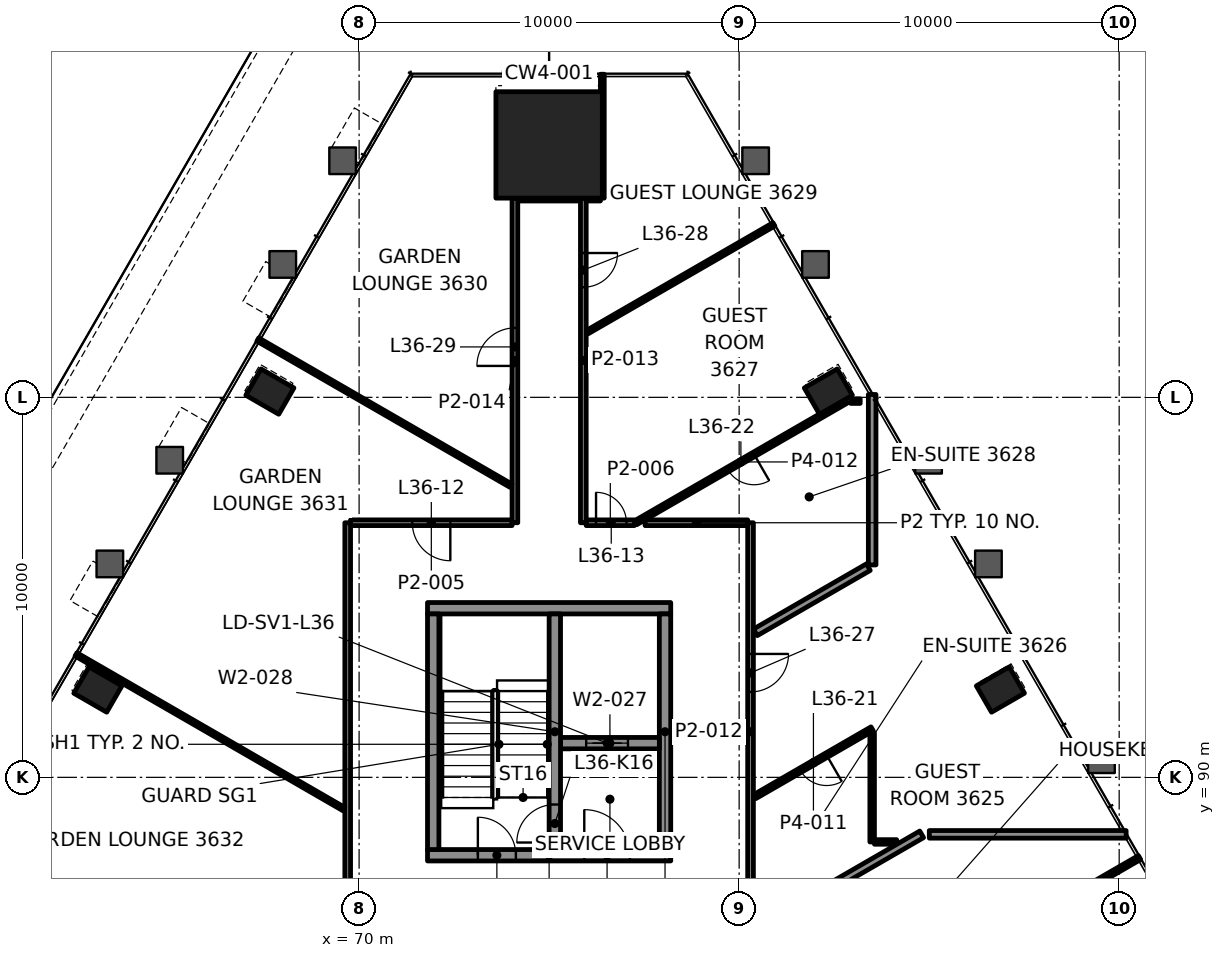
"""IFC4 building model, lengths in metres.
Left out: names, types, materials, properties, quantities, classifications, styles, units other than length and angle.
Written with IfcOpenShell. Run it as: python <this file> out.ifc"""

import sys

from ifc_helpers import new_model, si_unit, direction, frame, frame_2d, origin, origin_2d, place, context, subcontext, project, spatial, rectangle, hollow_rectangle, extrude, element, fill, save


model = new_model("IFC4")
c1 = context("Model", 3, precision=1e-05, world=origin(), true_north=direction((0.0, 1.0)))
c2 = subcontext(c1, "Body", "Model", "MODEL_VIEW")
j1 = project(units=[si_unit("LENGTHUNIT", "METRE"), si_unit("PLANEANGLEUNIT", "RADIAN")], contexts=[c1])
p1 = place(None, origin())
s1 = spatial("IfcSite", under=j1, at=p1, CompositionType="ELEMENT")
p2 = place(p1, origin())
s2 = spatial("IfcBuilding", under=s1, at=p2, CompositionType="ELEMENT")
p3 = place(p2, frame((0.0, 0.0, 159.7)))
s3 = spatial("IfcBuildingStorey", under=s2, at=p3, CompositionType="ELEMENT", Elevation=159.7)
p4 = place(p3, frame((75.0, 106.642, 0.0), z_axis=(0.0, 0.0, 1.0), x_axis=(-1.0, 0.0, 0.0)))
e1 = element("IfcColumn", 1, at=p4, inside=s3, PredefinedType="COLUMN", context=c2, shape_type="SweptSolid", body=[
    extrude(rectangle(XDim=2.8, YDim=2.8, at=origin_2d()), origin(), (0.0, 0.0, 1.0), 3.9),
])
for number, where, z_axis, x_axis in (
    (2, (86.875, 92.31, -0.0), (0.0, 0.0, 1.0), (-0.5, 0.866, 0.0)),
    (3, (82.348, 100.151, -0.0), (0.0, 0.0, 1.0), (-0.5, 0.866, 0.0)),
    (4, (67.652, 100.151, -0.0), (0.0, 0.0, 1.0), (-0.5, -0.866, 0.0)),
    (5, (63.125, 92.31, -0.0), (0.0, 0.0, 1.0), (-0.5, -0.866, 0.0)),
):
    element("IfcColumn", number, at=place(p3, frame(where, z_axis=z_axis, x_axis=x_axis)), inside=s3, PredefinedType="COLUMN", context=c2, shape_type="SweptSolid", body=[
        extrude(hollow_rectangle(XDim=0.8, YDim=1.0, WallThickness=0.05, at=origin_2d()), origin(), (0.0, 0.0, 1.0), 3.9),
    ])
p5 = place(p3, frame((71.8, 87.95, 0.0), z_axis=(0.0, 0.0, 1.0), x_axis=(1.0, 0.0, 0.0)))
e6 = element("IfcWall", 6, at=p5, inside=s3, PredefinedType="SHEAR", context=c2, shape_type="SweptSolid", body=[
    extrude(rectangle(XDim=6.4, YDim=0.3, at=frame_2d((3.2, 0.0))), origin(), (0.0, 0.0, 1.0), 3.7),
])
p6 = place(p5, frame((1.325, 0.0, 0.0)))
e7 = element("IfcOpeningElement", 7, at=p6, cuts=e6, PredefinedType="OPENING", context=c2, shape_type="SweptSolid", body=[
    extrude(rectangle(XDim=1.0, YDim=2.1, at=frame_2d((0.5, 1.05))), frame((0.0, 0.16, 0.0), z_axis=(0.0, -1.0, 0.0), x_axis=(1.0, 0.0, 0.0)), (0.0, 0.0, 1.0), 0.32),
])
p7 = place(p5, frame((4.125, 0.0, 0.0)))
e8 = element("IfcOpeningElement", 8, at=p7, cuts=e6, PredefinedType="OPENING", context=c2, shape_type="SweptSolid", body=[
    extrude(rectangle(XDim=1.2, YDim=2.1, at=frame_2d((0.6, 1.05))), frame((0.0, 0.16, 0.0), z_axis=(0.0, -1.0, 0.0), x_axis=(1.0, 0.0, 0.0)), (0.0, 0.0, 1.0), 0.32),
])
p8 = place(p3, frame((71.8, 94.45, 0.0), z_axis=(0.0, 0.0, 1.0), x_axis=(1.0, 0.0, 0.0)))
e9 = element("IfcWall", 9, at=p8, inside=s3, PredefinedType="SHEAR", context=c2, shape_type="SweptSolid", body=[
    extrude(rectangle(XDim=6.4, YDim=0.3, at=frame_2d((3.2, 0.0))), origin(), (0.0, 0.0, 1.0), 3.7),
])
for number, where, z_axis, x_axis in (
    (10, (71.95, 88.1, 0.0), (0.0, 0.0, 1.0), (0.0, 1.0, 0.0)),
    (11, (78.05, 88.1, 0.0), (0.0, 0.0, 1.0), (0.0, 1.0, 0.0)),
):
    element("IfcWall", number, at=place(p3, frame(where, z_axis=z_axis, x_axis=x_axis)), inside=s3, PredefinedType="SHEAR", context=c2, shape_type="SweptSolid", body=[
        extrude(rectangle(XDim=6.2, YDim=0.3, at=frame_2d((3.1, 0.0))), origin(), (0.0, 0.0, 1.0), 3.7),
    ])
p9 = place(p3, frame((75.3, 90.9, 0.0), z_axis=(0.0, 0.0, 1.0), x_axis=(1.0, 0.0, 0.0)))
e12 = element("IfcWall", 12, at=p9, inside=s3, PredefinedType="SHEAR", context=c2, shape_type="SweptSolid", body=[
    extrude(rectangle(XDim=2.6, YDim=0.3, at=frame_2d((1.3, 0.0))), origin(), (0.0, 0.0, 1.0), 3.7),
])
p10 = place(p9, frame((0.675, 0.0, 0.0)))
e13 = element("IfcOpeningElement", 13, at=p10, cuts=e12, PredefinedType="OPENING", context=c2, shape_type="SweptSolid", body=[
    extrude(rectangle(XDim=1.1, YDim=2.1, at=frame_2d((0.55, 1.05))), frame((0.0, 0.16, 0.0), z_axis=(0.0, -1.0, 0.0), x_axis=(1.0, 0.0, 0.0)), (0.0, 0.0, 1.0), 0.32),
])
p11 = place(p3, frame((75.15, 88.1, 0.0), z_axis=(0.0, 0.0, 1.0), x_axis=(0.0, 1.0, 0.0)))
e14 = element("IfcWall", 14, at=p11, inside=s3, PredefinedType="SHEAR", context=c2, shape_type="SweptSolid", body=[
    extrude(rectangle(XDim=6.2, YDim=0.3, at=frame_2d((3.1, 0.0))), origin(), (0.0, 0.0, 1.0), 3.7),
])
p12 = place(p11, frame((0.185, 0.0, 0.0)))
e15 = element("IfcOpeningElement", 15, at=p12, cuts=e14, PredefinedType="OPENING", context=c2, shape_type="SweptSolid", body=[
    extrude(rectangle(XDim=1.0, YDim=2.1, at=frame_2d((0.5, 1.05))), frame((0.0, 0.16, 0.0), z_axis=(0.0, -1.0, 0.0), x_axis=(1.0, 0.0, 0.0)), (0.0, 0.0, 1.0), 0.32),
])
p13 = place(p3, frame((83.56, 88.3, 0.0), z_axis=(0.0, 0.0, 1.0), x_axis=(1.0, 0.0, 0.0)))
e16 = element("IfcWall", 16, at=p13, inside=s3, PredefinedType="PARTITIONING", context=c2, shape_type="SweptSolid", body=[
    extrude(rectangle(XDim=0.585, YDim=0.12, at=frame_2d((0.292, 0.0))), origin(), (0.0, 0.0, 1.0), 3.1),
])
p14 = place(p3, frame((85.004, 88.5, 0.0), z_axis=(0.0, 0.0, 1.0), x_axis=(1.0, 0.0, 0.0)))
e17 = element("IfcWall", 17, at=p14, inside=s3, PredefinedType="PARTITIONING", context=c2, shape_type="SweptSolid", body=[
    extrude(rectangle(XDim=5.179, YDim=0.2, at=frame_2d((2.59, 0.0))), origin(), (0.0, 0.0, 1.0), 2.865),
])
p15 = place(p3, frame((74.025, 96.7, 0.0), z_axis=(0.0, 0.0, 1.0), x_axis=(-1.0, 0.0, 0.0)))
e18 = element("IfcWall", 18, at=p15, inside=s3, PredefinedType="PARTITIONING", context=c2, shape_type="SweptSolid", body=[
    extrude(rectangle(XDim=4.25, YDim=0.15, at=frame_2d((2.125, 0.0))), origin(), (0.0, 0.0, 1.0), 3.1),
])
p16 = place(p15, frame((1.625, 0.0, 0.0)))
e19 = element("IfcOpeningElement", 19, at=p16, cuts=e18, PredefinedType="OPENING", context=c2, shape_type="SweptSolid", body=[
    extrude(rectangle(XDim=1.0, YDim=2.1, at=frame_2d((0.5, 1.05))), frame((0.0, 0.085, 0.0), z_axis=(0.0, -1.0, 0.0), x_axis=(1.0, 0.0, 0.0)), (0.0, 0.0, 1.0), 0.17),
])
p17 = place(p3, frame((75.975, 96.7, 0.0), z_axis=(0.0, 0.0, 1.0), x_axis=(1.0, 0.0, 0.0)))
e20 = element("IfcWall", 20, at=p17, inside=s3, PredefinedType="PARTITIONING", context=c2, shape_type="SweptSolid", body=[
    extrude(rectangle(XDim=1.27, YDim=0.15, at=frame_2d((0.635, 0.0))), origin(), (0.0, 0.0, 1.0), 3.1),
])
p18 = place(p17, frame((0.26, 0.0, 0.0)))
e21 = element("IfcOpeningElement", 21, at=p18, cuts=e20, PredefinedType="OPENING", context=c2, shape_type="SweptSolid", body=[
    extrude(rectangle(XDim=0.8, YDim=2.1, at=frame_2d((0.4, 1.05))), frame((0.0, 0.085, 0.0), z_axis=(0.0, -1.0, 0.0), x_axis=(1.0, 0.0, 0.0)), (0.0, 0.0, 1.0), 0.17),
])
p19 = place(p3, frame((82.938, 99.9, 0.0), z_axis=(0.0, 0.0, 1.0), x_axis=(1.0, 0.0, 0.0)))
e22 = element("IfcWall", 22, at=p19, inside=s3, PredefinedType="PARTITIONING", context=c2, shape_type="SweptSolid", body=[
    extrude(rectangle(XDim=0.248, YDim=0.12, at=frame_2d((0.124, 0.0))), origin(), (0.0, 0.0, 1.0), 3.1),
])
p20 = place(p3, frame((74.176, 105.242, 0.0), z_axis=(0.0, 0.0, 1.0), x_axis=(1.0, 0.0, 0.0)))
e23 = element("IfcWall", 23, at=p20, inside=s3, PredefinedType="PARTITIONING", context=c2, shape_type="SweptSolid", body=[
    extrude(rectangle(XDim=1.649, YDim=0.15, at=frame_2d((0.825, 0.0))), origin(), (0.0, 0.0, 1.0), 3.097),
])
p21 = place(p3, frame((85.928, 85.23, 0.0), z_axis=(0.0, 0.0, 1.0), x_axis=(0.866037319036, 0.49997936161, 0.0)))
e24 = element("IfcWall", 24, at=p21, inside=s3, PredefinedType="PARTITIONING", context=c2, shape_type="SweptSolid", body=[
    extrude(rectangle(XDim=5.32, YDim=0.12, at=frame_2d((2.66, 0.0))), origin(), (0.0, 0.0, 1.0), 2.865),
])
p22 = place(p3, frame((80.427, 85.974, 0.0), z_axis=(0.0, 0.0, 1.0), x_axis=(0.866031085144, 0.499990159468, 0.0)))
e25 = element("IfcWall", 25, at=p22, inside=s3, PredefinedType="PARTITIONING", context=c2, shape_type="SweptSolid", body=[
    extrude(rectangle(XDim=5.052, YDim=0.2, at=frame_2d((2.526, 0.0))), origin(), (0.0, 0.0, 1.0), 3.1),
])
p23 = place(p3, frame((83.5, 91.277, 0.0), z_axis=(0.0, 0.0, 1.0), x_axis=(-0.866028357664, -0.499994883695, 0.0)))
e26 = element("IfcWall", 26, at=p23, inside=s3, PredefinedType="PARTITIONING", context=c2, shape_type="SweptSolid", body=[
    extrude(rectangle(XDim=3.568, YDim=0.12, at=frame_2d((1.784, 0.0))), origin(), (0.0, 0.0, 1.0), 3.1),
])
p24 = place(p23, frame((1.384, 0.0, 0.0)))
e27 = element("IfcOpeningElement", 27, at=p24, cuts=e26, PredefinedType="OPENING", context=c2, shape_type="SweptSolid", body=[
    extrude(rectangle(XDim=0.8, YDim=2.1, at=frame_2d((0.4, 1.05))), frame((0.0, 0.07, 0.0), z_axis=(0.0, -1.0, 0.0), x_axis=(1.0, 0.0, 0.0)), (0.0, 0.0, 1.0), 0.14),
])
p25 = place(p3, frame((80.427, 93.815, 0.0), z_axis=(0.0, 0.0, 1.0), x_axis=(0.866037544249, 0.499978971509, 0.0)))
e28 = element("IfcWall", 28, at=p25, inside=s3, PredefinedType="PARTITIONING", context=c2, shape_type="SweptSolid", body=[
    extrude(rectangle(XDim=3.433, YDim=0.2, at=frame_2d((1.716, 0.0))), origin(), (0.0, 0.0, 1.0), 3.1),
])
p26 = place(p3, frame((82.818, 99.9, 0.0), z_axis=(0.0, 0.0, 1.0), x_axis=(-0.866025499775, -0.499999833739, 0.0)))
e29 = element("IfcWall", 29, at=p26, inside=s3, PredefinedType="PARTITIONING", context=c2, shape_type="SweptSolid", body=[
    extrude(rectangle(XDim=6.4, YDim=0.12, at=frame_2d((3.2, 0.0))), origin(), (0.0, 0.0, 1.0), 2.865),
])
p27 = place(p26, frame((2.8, 0.0, 0.0)))
e30 = element("IfcOpeningElement", 30, at=p27, cuts=e29, PredefinedType="OPENING", context=c2, shape_type="SweptSolid", body=[
    extrude(rectangle(XDim=0.8, YDim=2.1, at=frame_2d((0.4, 1.05))), frame((0.0, 0.07, 0.0), z_axis=(0.0, -1.0, 0.0), x_axis=(1.0, 0.0, 0.0)), (0.0, 0.0, 1.0), 0.14),
])
p28 = place(p3, frame((76.001, 101.715, 0.0), z_axis=(0.0, 0.0, 1.0), x_axis=(0.866015782696, 0.500016663843, 0.0)))
e31 = element("IfcWall", 31, at=p28, inside=s3, PredefinedType="PARTITIONING", context=c2, shape_type="SweptSolid", body=[
    extrude(rectangle(XDim=5.675, YDim=0.1, at=frame_2d((2.837, 0.0))), origin(), (0.0, 0.0, 1.0), 3.1),
])
p29 = place(p3, frame((83.5, 88.3, 0.0), z_axis=(0.0, 0.0, 1.0), x_axis=(0.0, 1.0, 0.0)))
e32 = element("IfcWall", 32, at=p29, inside=s3, PredefinedType="PARTITIONING", context=c2, shape_type="SweptSolid", body=[
    extrude(rectangle(XDim=2.868, YDim=0.12, at=frame_2d((1.434, 0.0))), origin(), (0.0, 0.0, 1.0), 3.022),
])
p30 = place(p3, frame((83.5, 95.589, 0.0), z_axis=(0.0, 0.0, 1.0), x_axis=(0.0, 1.0, 0.0)))
e33 = element("IfcWall", 33, at=p30, inside=s3, PredefinedType="PARTITIONING", context=c2, shape_type="SweptSolid", body=[
    extrude(rectangle(XDim=4.486, YDim=0.2, at=frame_2d((2.243, 0.0))), origin(), (0.0, 0.0, 1.0), 2.865),
])
p31 = place(p3, frame((80.3, 96.7, 0.0), z_axis=(0.0, 0.0, 1.0), x_axis=(0.0, -1.0, 0.0)))
e34 = element("IfcWall", 34, at=p31, inside=s3, PredefinedType="PARTITIONING", context=c2, shape_type="SweptSolid", body=[
    extrude(rectangle(XDim=11.0, YDim=0.15, at=frame_2d((5.5, 0.0))), origin(), (0.0, 0.0, 1.0), 3.022),
])
p32 = place(p31, frame((3.452, 0.0, 0.0)))
e35 = element("IfcOpeningElement", 35, at=p32, cuts=e34, PredefinedType="OPENING", context=c2, shape_type="SweptSolid", body=[
    extrude(rectangle(XDim=1.0, YDim=2.1, at=frame_2d((0.5, 1.05))), frame((0.0, 0.085, 0.0), z_axis=(0.0, -1.0, 0.0), x_axis=(1.0, 0.0, 0.0)), (0.0, 0.0, 1.0), 0.17),
])
p33 = place(p3, frame((76.4, 105.243, 0.0), z_axis=(0.0, 0.0, 1.0), x_axis=(0.0, 1.0, 0.0)))
e36 = element("IfcWall", 36, at=p33, inside=s3, PredefinedType="PARTITIONING", context=c2, shape_type="SweptSolid", body=[
    extrude(rectangle(XDim=3.26, YDim=0.1, at=frame_2d((1.63, 0.0))), origin(), (0.0, 0.0, 1.0), 3.1),
])
p34 = place(p3, frame((75.9, 105.242, 0.0), z_axis=(0.0, 0.0, 1.0), x_axis=(0.0, -1.0, 0.0)))
e37 = element("IfcWall", 37, at=p34, inside=s3, PredefinedType="PARTITIONING", context=c2, shape_type="SweptSolid", body=[
    extrude(rectangle(XDim=8.542, YDim=0.15, at=frame_2d((4.271, 0.0))), origin(), (0.0, 0.0, 1.0), 3.1),
])
p35 = place(p34, frame((1.445, 0.0, 0.0)))
e38 = element("IfcOpeningElement", 38, at=p35, cuts=e37, PredefinedType="OPENING", context=c2, shape_type="SweptSolid", body=[
    extrude(rectangle(XDim=0.9, YDim=2.1, at=frame_2d((0.45, 1.05))), frame((0.0, 0.085, 0.0), z_axis=(0.0, -1.0, 0.0), x_axis=(1.0, 0.0, 0.0)), (0.0, 0.0, 1.0), 0.17),
])
p36 = place(p3, frame((74.1, 96.7, 0.0), z_axis=(0.0, 0.0, 1.0), x_axis=(0.0, 1.0, 0.0)))
e39 = element("IfcWall", 39, at=p36, inside=s3, PredefinedType="PARTITIONING", context=c2, shape_type="SweptSolid", body=[
    extrude(rectangle(XDim=8.542, YDim=0.15, at=frame_2d((4.271, 0.0))), origin(), (0.0, 0.0, 1.0), 3.1),
])
p37 = place(p36, frame((4.127, 0.0, 0.0)))
e40 = element("IfcOpeningElement", 40, at=p37, cuts=e39, PredefinedType="OPENING", context=c2, shape_type="SweptSolid", body=[
    extrude(rectangle(XDim=1.0, YDim=2.1, at=frame_2d((0.5, 1.05))), frame((0.0, 0.085, 0.0), z_axis=(0.0, -1.0, 0.0), x_axis=(1.0, 0.0, 0.0)), (0.0, 0.0, 1.0), 0.17),
])
p38 = place(p3, frame((69.7, 85.7, 0.0), z_axis=(0.0, 0.0, 1.0), x_axis=(0.0, 1.0, 0.0)))
e41 = element("IfcWall", 41, at=p38, inside=s3, PredefinedType="PARTITIONING", context=c2, shape_type="SweptSolid", body=[
    extrude(rectangle(XDim=10.999, YDim=0.15, at=frame_2d((5.5, 0.0))), origin(), (0.0, 0.0, 1.0), 3.022),
])
p39 = place(p3, frame((73.999, 97.673, 0.0), z_axis=(0.0, 0.0, 1.0), x_axis=(-0.86601864019, 0.500011714706, 0.0)))
e42 = element("IfcWall", 42, at=p39, inside=s3, PredefinedType="PARTITIONING", context=c2, shape_type="SweptSolid", body=[
    extrude(rectangle(XDim=7.696, YDim=0.1, at=frame_2d((3.848, 0.0))), origin(), (0.0, 0.0, 1.0), 3.1),
])
p40 = place(p3, frame((69.599, 89.166, 0.0), z_axis=(0.0, 0.0, 1.0), x_axis=(-0.866026732215, 0.499997699084, 0.0)))
e43 = element("IfcWall", 43, at=p40, inside=s3, PredefinedType="PARTITIONING", context=c2, shape_type="SweptSolid", body=[
    extrude(rectangle(XDim=8.139, YDim=0.1, at=frame_2d((4.069, 0.0))), origin(), (0.0, 0.0, 1.0), 2.865),
])
p41 = place(p3, frame((77.525, 96.7, 0.0), z_axis=(0.0, 0.0, 1.0), x_axis=(1.0, 0.0, 0.0)))
e44 = element("IfcWall", 44, at=p41, inside=s3, PredefinedType="PARTITIONING", context=c2, shape_type="SweptSolid", body=[
    extrude(rectangle(XDim=2.7, YDim=0.15, at=frame_2d((1.35, 0.0))), origin(), (0.0, 0.0, 1.0), 3.1),
])
p42 = place(p3, frame((75.975, 105.242, 0.0), z_axis=(0.0, 0.0, 1.0), x_axis=(1.0, 0.0, 0.0)))
e45 = element("IfcWall", 45, at=p42, inside=s3, PredefinedType="PARTITIONING", context=c2, shape_type="SweptSolid", body=[
    extrude(rectangle(XDim=0.375, YDim=0.15, at=frame_2d((0.187, 0.0))), origin(), (0.0, 0.0, 1.0), 3.1),
])
p43 = place(p3, frame((69.117, 111.388, 0.0), z_axis=(0.0, 0.0, 1.0), x_axis=(-0.49999896751, -0.866025999892, 0.0)))
e46 = element("IfcWall", 46, at=p43, inside=s3, PredefinedType="SOLIDWALL", context=c2, shape_type="SweptSolid", body=[
    extrude(rectangle(XDim=57.143, YDim=0.8, at=frame_2d((28.571, 0.0))), origin(), (0.0, 0.0, 1.0), 0.9),
])
p44 = place(p16, origin())
e47 = element("IfcDoor", 47, at=p44, inside=s3, OperationType="SINGLE_SWING_LEFT", PredefinedType="DOOR", context=c2, shape_type="SweptSolid", body=[
    extrude(rectangle(XDim=1.0, YDim=2.1, at=frame_2d((0.5, 1.05))), frame((0.0, 0.025, 0.0), z_axis=(0.0, -1.0, 0.0), x_axis=(1.0, 0.0, 0.0)), (0.0, 0.0, 1.0), 0.05),
])
fill(e19, e47)
p45 = place(p18, origin())
e48 = element("IfcDoor", 48, at=p45, inside=s3, OperationType="SINGLE_SWING_RIGHT", PredefinedType="DOOR", context=c2, shape_type="SweptSolid", body=[
    extrude(rectangle(XDim=0.8, YDim=2.1, at=frame_2d((0.4, 1.05))), frame((0.0, 0.025, 0.0), z_axis=(0.0, -1.0, 0.0), x_axis=(1.0, 0.0, 0.0)), (0.0, 0.0, 1.0), 0.05),
])
fill(e21, e48)
p46 = place(p24, origin())
e49 = element("IfcDoor", 49, at=p46, inside=s3, OperationType="SINGLE_SWING_RIGHT", PredefinedType="DOOR", context=c2, shape_type="SweptSolid", body=[
    extrude(rectangle(XDim=0.8, YDim=2.1, at=frame_2d((0.4, 1.05))), frame((0.0, 0.025, 0.0), z_axis=(0.0, -1.0, 0.0), x_axis=(1.0, 0.0, 0.0)), (0.0, 0.0, 1.0), 0.05),
])
fill(e27, e49)
p47 = place(p27, origin())
e50 = element("IfcDoor", 50, at=p47, inside=s3, OperationType="SINGLE_SWING_RIGHT", PredefinedType="DOOR", context=c2, shape_type="SweptSolid", body=[
    extrude(rectangle(XDim=0.8, YDim=2.1, at=frame_2d((0.4, 1.05))), frame((0.0, 0.025, 0.0), z_axis=(0.0, -1.0, 0.0), x_axis=(1.0, 0.0, 0.0)), (0.0, 0.0, 1.0), 0.05),
])
fill(e30, e50)
p48 = place(p32, origin())
e51 = element("IfcDoor", 51, at=p48, inside=s3, OperationType="SINGLE_SWING_LEFT", PredefinedType="DOOR", context=c2, shape_type="SweptSolid", body=[
    extrude(rectangle(XDim=1.0, YDim=2.1, at=frame_2d((0.5, 1.05))), frame((0.0, 0.025, 0.0), z_axis=(0.0, -1.0, 0.0), x_axis=(1.0, 0.0, 0.0)), (0.0, 0.0, 1.0), 0.05),
])
fill(e35, e51)
p49 = place(p35, origin())
e52 = element("IfcDoor", 52, at=p49, inside=s3, OperationType="SINGLE_SWING_LEFT", PredefinedType="DOOR", context=c2, shape_type="SweptSolid", body=[
    extrude(rectangle(XDim=0.9, YDim=2.1, at=frame_2d((0.45, 1.05))), frame((0.0, 0.025, 0.0), z_axis=(0.0, -1.0, 0.0), x_axis=(1.0, 0.0, 0.0)), (0.0, 0.0, 1.0), 0.05),
])
fill(e38, e52)
p50 = place(p37, origin())
e53 = element("IfcDoor", 53, at=p50, inside=s3, OperationType="SINGLE_SWING_LEFT", PredefinedType="DOOR", context=c2, shape_type="SweptSolid", body=[
    extrude(rectangle(XDim=1.0, YDim=2.1, at=frame_2d((0.5, 1.05))), frame((0.0, 0.025, 0.0), z_axis=(0.0, -1.0, 0.0), x_axis=(1.0, 0.0, 0.0)), (0.0, 0.0, 1.0), 0.05),
])
fill(e40, e53)
p51 = place(p10, origin())
e54 = element("IfcDoor", 54, at=p51, inside=s3, OperationType="DOUBLE_DOOR_SLIDING", PredefinedType="DOOR", context=c2, shape_type="SweptSolid", body=[
    extrude(rectangle(XDim=1.1, YDim=2.1, at=frame_2d((0.55, 1.05))), frame((0.0, 0.025, 0.0), z_axis=(0.0, -1.0, 0.0), x_axis=(1.0, 0.0, 0.0)), (0.0, 0.0, 1.0), 0.05),
])
fill(e13, e54)
p52 = place(p6, origin())
e55 = element("IfcDoor", 55, at=p52, inside=s3, OperationType="SINGLE_SWING_RIGHT", PredefinedType="DOOR", context=c2, shape_type="SweptSolid", body=[
    extrude(rectangle(XDim=1.0, YDim=2.1, at=frame_2d((0.5, 1.05))), frame((0.0, 0.025, 0.0), z_axis=(0.0, -1.0, 0.0), x_axis=(1.0, 0.0, 0.0)), (0.0, 0.0, 1.0), 0.05),
])
fill(e7, e55)
p53 = place(p12, origin())
e56 = element("IfcDoor", 56, at=p53, inside=s3, OperationType="SINGLE_SWING_LEFT", PredefinedType="DOOR", context=c2, shape_type="SweptSolid", body=[
    extrude(rectangle(XDim=1.0, YDim=2.1, at=frame_2d((0.5, 1.05))), frame((0.0, 0.025, 0.0), z_axis=(0.0, -1.0, 0.0), x_axis=(1.0, 0.0, 0.0)), (0.0, 0.0, 1.0), 0.05),
])
fill(e15, e56)
p54 = place(p7, origin())
e57 = element("IfcDoor", 57, at=p54, inside=s3, OperationType="SINGLE_SWING_RIGHT", PredefinedType="DOOR", context=c2, shape_type="SweptSolid", body=[
    extrude(rectangle(XDim=1.2, YDim=2.1, at=frame_2d((0.6, 1.05))), frame((0.0, 0.025, 0.0), z_axis=(0.0, -1.0, 0.0), x_axis=(1.0, 0.0, 0.0)), (0.0, 0.0, 1.0), 0.05),
])
fill(e8, e57)
save(model, sys.argv[1])
